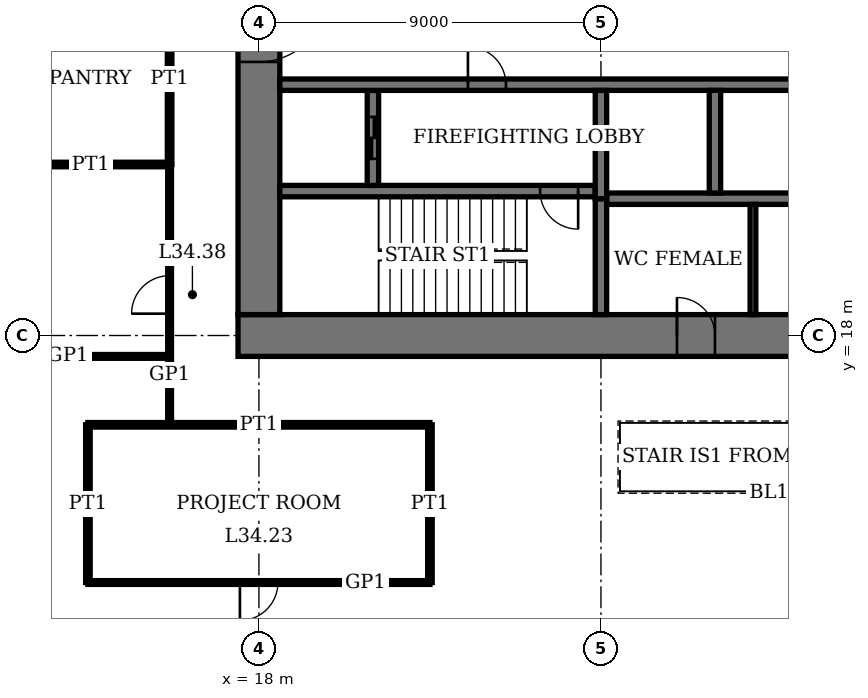
"""IFC4 building model, lengths in metres.
Left out: names, types, materials, properties, quantities, classifications, styles, units other than length and angle.
Written with IfcOpenShell. Run it as: python <this file> out.ifc"""

import sys

from ifc_helpers import new_model, si_unit, direction, frame, frame_2d, origin, place, context, subcontext, project, spatial, rectangle, extrude, element, fill, save


model = new_model("IFC4")
c1 = context("Model", 3, precision=1e-05, world=origin(), true_north=direction((0.0, 1.0)))
c2 = subcontext(c1, "Body", "Model", "MODEL_VIEW")
j1 = project(units=[si_unit("LENGTHUNIT", "METRE"), si_unit("PLANEANGLEUNIT", "RADIAN")], contexts=[c1])
p1 = place(None, origin())
s1 = spatial("IfcSite", under=j1, at=p1, CompositionType="ELEMENT")
p2 = place(p1, origin())
s2 = spatial("IfcBuilding", under=s1, at=p2, CompositionType="ELEMENT")
p3 = place(p2, frame((0.0, 0.0, 141.0)))
s3 = spatial("IfcBuildingStorey", under=s2, at=p3, CompositionType="ELEMENT", Elevation=141.0)
p4 = place(p3, frame((17.45, 18.0, 0.0), z_axis=(0.0, 0.0, 1.0), x_axis=(1.0, 0.0, 0.0)))
e1 = element("IfcWall", 1, at=p4, inside=s3, PredefinedType="SHEAR", context=c2, shape_type="SweptSolid", body=[
    extrude(rectangle(XDim=28.1, YDim=1.1, at=frame_2d((14.05, 0.0))), origin(), (0.0, 0.0, 1.0), 4.0),
])
p5 = place(p4, frame((11.55, 0.0, 0.0)))
e2 = element("IfcOpeningElement", 2, at=p5, cuts=e1, PredefinedType="OPENING", context=c2, shape_type="SweptSolid", body=[
    extrude(rectangle(XDim=1.0, YDim=2.4, at=frame_2d((0.5, 1.2))), frame((0.0, 0.56, 0.0), z_axis=(0.0, -1.0, 0.0), x_axis=(1.0, 0.0, 0.0)), (0.0, 0.0, 1.0), 1.12),
])
p6 = place(p4, frame((16.55, 0.0, 0.0)))
e3 = element("IfcOpeningElement", 3, at=p6, cuts=e1, PredefinedType="OPENING", context=c2, shape_type="SweptSolid", body=[
    extrude(rectangle(XDim=1.0, YDim=2.4, at=frame_2d((0.5, 1.2))), frame((0.0, 0.56, 0.0), z_axis=(0.0, -1.0, 0.0), x_axis=(1.0, 0.0, 0.0)), (0.0, 0.0, 1.0), 1.12),
])
p7 = place(p4, frame((20.0, 0.0, 0.0)))
e4 = element("IfcOpeningElement", 4, at=p7, cuts=e1, PredefinedType="OPENING", context=c2, shape_type="SweptSolid", body=[
    extrude(rectangle(XDim=1.1, YDim=2.4, at=frame_2d((0.55, 1.2))), frame((0.0, 0.56, 0.0), z_axis=(0.0, -1.0, 0.0), x_axis=(1.0, 0.0, 0.0)), (0.0, 0.0, 1.0), 1.12),
])
p8 = place(p4, frame((24.05, 0.0, 0.0)))
e5 = element("IfcOpeningElement", 5, at=p8, cuts=e1, PredefinedType="OPENING", context=c2, shape_type="SweptSolid", body=[
    extrude(rectangle(XDim=1.0, YDim=2.4, at=frame_2d((0.5, 1.2))), frame((0.0, 0.56, 0.0), z_axis=(0.0, -1.0, 0.0), x_axis=(1.0, 0.0, 0.0)), (0.0, 0.0, 1.0), 1.12),
])
p9 = place(p3, frame((18.0, 35.45, 0.0), z_axis=(0.0, 0.0, 1.0), x_axis=(0.0, -1.0, 0.0)))
e6 = element("IfcWall", 6, at=p9, inside=s3, PredefinedType="SHEAR", context=c2, shape_type="SweptSolid", body=[
    extrude(rectangle(XDim=16.9, YDim=1.1, at=frame_2d((8.45, 0.0))), origin(), (0.0, 0.0, 1.0), 4.0),
])
p10 = place(p9, frame((8.45, 0.0, 0.0)))
e7 = element("IfcOpeningElement", 7, at=p10, cuts=e6, PredefinedType="OPENING", context=c2, shape_type="SweptSolid", body=[
    extrude(rectangle(XDim=1.8, YDim=2.4, at=frame_2d((0.9, 1.2))), frame((0.0, 0.56, 0.0), z_axis=(0.0, -1.0, 0.0), x_axis=(1.0, 0.0, 0.0)), (0.0, 0.0, 1.0), 1.12),
])
p11 = place(p3, frame((18.55, 21.8, 0.0), z_axis=(0.0, 0.0, 1.0), x_axis=(1.0, 0.0, 0.0)))
e8 = element("IfcWall", 8, at=p11, inside=s3, PredefinedType="SHEAR", context=c2, shape_type="SweptSolid", body=[
    extrude(rectangle(XDim=8.3, YDim=0.3, at=frame_2d((4.15, 0.0))), origin(), (0.0, 0.0, 1.0), 4.0),
])
p12 = place(p11, frame((6.85, 0.0, 0.0)))
e9 = element("IfcOpeningElement", 9, at=p12, cuts=e8, PredefinedType="OPENING", context=c2, shape_type="SweptSolid", body=[
    extrude(rectangle(XDim=1.0, YDim=2.4, at=frame_2d((0.5, 1.2))), frame((0.0, 0.16, 0.0), z_axis=(0.0, -1.0, 0.0), x_axis=(1.0, 0.0, 0.0)), (0.0, 0.0, 1.0), 0.32),
])
p13 = place(p3, frame((27.0, 18.55, 0.0), z_axis=(0.0, 0.0, 1.0), x_axis=(0.0, 1.0, 0.0)))
e10 = element("IfcWall", 10, at=p13, inside=s3, PredefinedType="SHEAR", context=c2, shape_type="SweptSolid", body=[
    extrude(rectangle(XDim=3.05, YDim=0.3, at=frame_2d((1.525, 0.0))), origin(), (0.0, 0.0, 1.0), 4.0),
])
p14 = place(p3, frame((21.0, 21.95, 0.0), z_axis=(0.0, 0.0, 1.0), x_axis=(0.0, 1.0, 0.0)))
e11 = element("IfcWall", 11, at=p14, inside=s3, PredefinedType="SHEAR", context=c2, shape_type="SweptSolid", body=[
    extrude(rectangle(XDim=2.5, YDim=0.3, at=frame_2d((1.25, 0.0))), origin(), (0.0, 0.0, 1.0), 4.0),
])
p15 = place(p14, frame((0.7, 0.0, 0.0)))
e12 = element("IfcOpeningElement", 12, at=p15, cuts=e11, PredefinedType="OPENING", context=c2, shape_type="SweptSolid", body=[
    extrude(rectangle(XDim=1.1, YDim=2.4, at=frame_2d((0.55, 1.2))), frame((0.0, 0.16, 0.0), z_axis=(0.0, -1.0, 0.0), x_axis=(1.0, 0.0, 0.0)), (0.0, 0.0, 1.0), 0.32),
])
p16 = place(p3, frame((18.55, 24.6, 0.0), z_axis=(0.0, 0.0, 1.0), x_axis=(1.0, 0.0, 0.0)))
e13 = element("IfcWall", 13, at=p16, inside=s3, PredefinedType="SHEAR", context=c2, shape_type="SweptSolid", body=[
    extrude(rectangle(XDim=25.9, YDim=0.3, at=frame_2d((12.95, 0.0))), origin(), (0.0, 0.0, 1.0), 4.0),
])
p17 = place(p16, frame((4.95, 0.0, 0.0)))
e14 = element("IfcOpeningElement", 14, at=p17, cuts=e13, PredefinedType="OPENING", context=c2, shape_type="SweptSolid", body=[
    extrude(rectangle(XDim=1.0, YDim=2.4, at=frame_2d((0.5, 1.2))), frame((0.0, 0.16, 0.0), z_axis=(0.0, -1.0, 0.0), x_axis=(1.0, 0.0, 0.0)), (0.0, 0.0, 1.0), 0.32),
])
p18 = place(p16, frame((24.5, 0.0, 0.0)))
e15 = element("IfcOpeningElement", 15, at=p18, cuts=e13, PredefinedType="OPENING", context=c2, shape_type="SweptSolid", body=[
    extrude(rectangle(XDim=0.9, YDim=2.1, at=frame_2d((0.45, 1.05))), frame((0.0, 0.16, 0.0), z_axis=(0.0, -1.0, 0.0), x_axis=(1.0, 0.0, 0.0)), (0.0, 0.0, 1.0), 0.32),
])
p19 = place(p16, frame((21.3, 0.0, 0.0)))
e16 = element("IfcOpeningElement", 16, at=p19, cuts=e13, PredefinedType="OPENING", context=c2, shape_type="SweptSolid", body=[
    extrude(rectangle(XDim=1.3, YDim=2.4, at=frame_2d((0.65, 1.2))), frame((0.0, 0.16, 0.0), z_axis=(0.0, -1.0, 0.0), x_axis=(1.0, 0.0, 0.0)), (0.0, 0.0, 1.0), 0.32),
])
p20 = place(p3, frame((27.15, 21.6, 0.0), z_axis=(0.0, 0.0, 1.0), x_axis=(1.0, 0.0, 0.0)))
e17 = element("IfcWall", 17, at=p20, inside=s3, PredefinedType="SHEAR", context=c2, shape_type="SweptSolid", body=[
    extrude(rectangle(XDim=17.3, YDim=0.3, at=frame_2d((8.65, 0.0))), origin(), (0.0, 0.0, 1.0), 4.0),
])
p21 = place(p3, frame((30.0, 21.75, 0.0), z_axis=(0.0, 0.0, 1.0), x_axis=(0.0, 1.0, 0.0)))
e18 = element("IfcWall", 18, at=p21, inside=s3, PredefinedType="SHEAR", context=c2, shape_type="SweptSolid", body=[
    extrude(rectangle(XDim=2.7, YDim=0.3, at=frame_2d((1.35, 0.0))), origin(), (0.0, 0.0, 1.0), 4.0),
])
p22 = place(p3, frame((27.0, 21.6, 0.0), z_axis=(0.0, 0.0, 1.0), x_axis=(0.0, 1.0, 0.0)))
e19 = element("IfcWall", 19, at=p22, inside=s3, PredefinedType="SHEAR", context=c2, shape_type="SweptSolid", body=[
    extrude(rectangle(XDim=2.85, YDim=0.3, at=frame_2d((1.425, 0.0))), origin(), (0.0, 0.0, 1.0), 4.0),
])
p23 = place(p3, frame((13.5, 11.5, 0.0), z_axis=(0.0, 0.0, 1.0), x_axis=(1.0, 0.0, 0.0)))
e20 = element("IfcWall", 20, at=p23, inside=s3, PredefinedType="PARTITIONING", context=c2, shape_type="SweptSolid", body=[
    extrude(rectangle(XDim=9.0, YDim=0.1, at=frame_2d((4.5, 0.0))), origin(), (0.0, 0.0, 1.0), 3.75),
])
p24 = place(p23, frame((4.0, 0.0, 0.0)))
e21 = element("IfcOpeningElement", 21, at=p24, cuts=e20, PredefinedType="OPENING", context=c2, shape_type="SweptSolid", body=[
    extrude(rectangle(XDim=1.0, YDim=2.4, at=frame_2d((0.5, 1.2))), frame((0.0, 0.06, 0.0), z_axis=(0.0, -1.0, 0.0), x_axis=(1.0, 0.0, 0.0)), (0.0, 0.0, 1.0), 0.12),
])
p25 = place(p3, frame((13.5, 15.65, 0.0), z_axis=(0.0, 0.0, 1.0), x_axis=(1.0, 0.0, 0.0)))
e22 = element("IfcWall", 22, at=p25, inside=s3, PredefinedType="PARTITIONING", context=c2, shape_type="SweptSolid", body=[
    extrude(rectangle(XDim=9.0, YDim=0.12, at=frame_2d((4.5, 0.0))), origin(), (0.0, 0.0, 1.0), 3.75),
])
p26 = place(p3, frame((9.9, 17.45, 0.0), z_axis=(0.0, 0.0, 1.0), x_axis=(1.0, 0.0, 0.0)))
e23 = element("IfcWall", 23, at=p26, inside=s3, PredefinedType="PARTITIONING", context=c2, shape_type="SweptSolid", body=[
    extrude(rectangle(XDim=5.75, YDim=0.1, at=frame_2d((2.875, 0.0))), origin(), (0.0, 0.0, 1.0), 3.05),
])
p27 = place(p3, frame((11.5, 22.5, 0.0), z_axis=(0.0, 0.0, 1.0), x_axis=(1.0, 0.0, 0.0)))
e24 = element("IfcWall", 24, at=p27, inside=s3, PredefinedType="PARTITIONING", context=c2, shape_type="SweptSolid", body=[
    extrude(rectangle(XDim=4.15, YDim=0.12, at=frame_2d((2.075, 0.0))), origin(), (0.0, 0.0, 1.0), 3.1),
])
p28 = place(p3, frame((13.5, 11.5, 0.0), z_axis=(0.0, 0.0, 1.0), x_axis=(0.0, 1.0, 0.0)))
e25 = element("IfcWall", 25, at=p28, inside=s3, PredefinedType="PARTITIONING", context=c2, shape_type="SweptSolid", body=[
    extrude(rectangle(XDim=4.15, YDim=0.12, at=frame_2d((2.075, 0.0))), origin(), (0.0, 0.0, 1.0), 3.75),
])
p29 = place(p3, frame((15.65, 22.5, 0.0), z_axis=(0.0, 0.0, 1.0), x_axis=(0.0, 1.0, 0.0)))
e26 = element("IfcWall", 26, at=p29, inside=s3, PredefinedType="PARTITIONING", context=c2, shape_type="SweptSolid", body=[
    extrude(rectangle(XDim=4.5, YDim=0.12, at=frame_2d((2.25, 0.0))), origin(), (0.0, 0.0, 1.0), 3.75),
])
p30 = place(p3, frame((15.65, 15.65, 0.0), z_axis=(0.0, 0.0, 1.0), x_axis=(0.0, 1.0, 0.0)))
e27 = element("IfcWall", 27, at=p30, inside=s3, PredefinedType="PARTITIONING", context=c2, shape_type="SweptSolid", body=[
    extrude(rectangle(XDim=6.85, YDim=0.1, at=frame_2d((3.425, 0.0))), origin(), (0.0, 0.0, 1.0), 3.75),
])
p31 = place(p30, frame((2.925, 0.0, 0.0)))
e28 = element("IfcOpeningElement", 28, at=p31, cuts=e27, PredefinedType="OPENING", context=c2, shape_type="SweptSolid", body=[
    extrude(rectangle(XDim=1.0, YDim=2.4, at=frame_2d((0.5, 1.2))), frame((0.0, 0.06, 0.0), z_axis=(0.0, -1.0, 0.0), x_axis=(1.0, 0.0, 0.0)), (0.0, 0.0, 1.0), 0.12),
])
p32 = place(p3, frame((22.5, 11.5, 0.0), z_axis=(0.0, 0.0, 1.0), x_axis=(0.0, 1.0, 0.0)))
e29 = element("IfcWall", 29, at=p32, inside=s3, PredefinedType="PARTITIONING", context=c2, shape_type="SweptSolid", body=[
    extrude(rectangle(XDim=4.15, YDim=0.12, at=frame_2d((2.075, 0.0))), origin(), (0.0, 0.0, 1.0), 3.75),
])
p33 = place(p3, frame((31.0, 18.55, 0.0), z_axis=(0.0, 0.0, 1.0), x_axis=(0.0, 1.0, 0.0)))
e30 = element("IfcWall", 30, at=p33, inside=s3, PredefinedType="PARTITIONING", context=c2, shape_type="SweptSolid", body=[
    extrude(rectangle(XDim=2.9, YDim=0.15, at=frame_2d((1.45, 0.0))), origin(), (0.0, 0.0, 1.0), 3.75),
])
p34 = place(p10, origin())
e31 = element("IfcDoor", 31, at=p34, inside=s3, OperationType="DOUBLE_DOOR_DOUBLE_SWING", PredefinedType="DOOR", context=c2, shape_type="SweptSolid", body=[
    extrude(rectangle(XDim=1.8, YDim=2.4, at=frame_2d((0.9, 1.2))), frame((0.0, 0.03, 0.0), z_axis=(0.0, -1.0, 0.0), x_axis=(1.0, 0.0, 0.0)), (0.0, 0.0, 1.0), 0.06),
    extrude(rectangle(XDim=0.04, YDim=2.4, at=frame_2d((0.02, 1.2))), frame((0.0, 0.55, 0.0), z_axis=(0.0, -1.0, 0.0), x_axis=(1.0, 0.0, 0.0)), (0.0, 0.0, 1.0), 1.1),
    extrude(rectangle(XDim=0.04, YDim=2.4, at=frame_2d((1.78, 1.2))), frame((0.0, 0.55, 0.0), z_axis=(0.0, -1.0, 0.0), x_axis=(1.0, 0.0, 0.0)), (0.0, 0.0, 1.0), 1.1),
    extrude(rectangle(XDim=1.8, YDim=0.04, at=frame_2d((0.9, 2.38))), frame((0.0, 0.55, 0.0), z_axis=(0.0, -1.0, 0.0), x_axis=(1.0, 0.0, 0.0)), (0.0, 0.0, 1.0), 1.1),
])
fill(e7, e31)
p35 = place(p5, origin())
e32 = element("IfcDoor", 32, at=p35, inside=s3, OperationType="SINGLE_SWING_RIGHT", PredefinedType="DOOR", context=c2, shape_type="SweptSolid", body=[
    extrude(rectangle(XDim=1.0, YDim=2.4, at=frame_2d((0.5, 1.2))), frame((0.0, 0.025, 0.0), z_axis=(0.0, -1.0, 0.0), x_axis=(1.0, 0.0, 0.0)), (0.0, 0.0, 1.0), 0.05),
    extrude(rectangle(XDim=0.04, YDim=2.4, at=frame_2d((0.02, 1.2))), frame((0.0, 0.4, 0.0), z_axis=(0.0, -1.0, 0.0), x_axis=(1.0, 0.0, 0.0)), (0.0, 0.0, 1.0), 0.8),
    extrude(rectangle(XDim=0.04, YDim=2.4, at=frame_2d((0.98, 1.2))), frame((0.0, 0.4, 0.0), z_axis=(0.0, -1.0, 0.0), x_axis=(1.0, 0.0, 0.0)), (0.0, 0.0, 1.0), 0.8),
    extrude(rectangle(XDim=1.0, YDim=0.04, at=frame_2d((0.5, 2.38))), frame((0.0, 0.4, 0.0), z_axis=(0.0, -1.0, 0.0), x_axis=(1.0, 0.0, 0.0)), (0.0, 0.0, 1.0), 0.8),
])
fill(e2, e32)
p36 = place(p12, origin())
e33 = element("IfcDoor", 33, at=p36, inside=s3, OperationType="SINGLE_SWING_RIGHT", PredefinedType="DOOR", context=c2, shape_type="SweptSolid", body=[
    extrude(rectangle(XDim=1.0, YDim=2.4, at=frame_2d((0.5, 1.2))), frame((0.0, 0.03, 0.0), z_axis=(0.0, -1.0, 0.0), x_axis=(1.0, 0.0, 0.0)), (0.0, 0.0, 1.0), 0.06),
])
fill(e9, e33)
p37 = place(p17, origin())
e34 = element("IfcDoor", 34, at=p37, inside=s3, OperationType="SINGLE_SWING_RIGHT", PredefinedType="DOOR", context=c2, shape_type="SweptSolid", body=[
    extrude(rectangle(XDim=1.0, YDim=2.4, at=frame_2d((0.5, 1.2))), frame((0.0, 0.03, 0.0), z_axis=(0.0, -1.0, 0.0), x_axis=(1.0, 0.0, 0.0)), (0.0, 0.0, 1.0), 0.06),
])
fill(e14, e34)
p38 = place(p24, origin())
e35 = element("IfcDoor", 35, at=p38, inside=s3, OperationType="SINGLE_SWING_LEFT", PredefinedType="DOOR", context=c2, shape_type="SweptSolid", body=[
    extrude(rectangle(XDim=1.0, YDim=2.4, at=frame_2d((0.5, 1.2))), frame((0.0, 0.02, 0.0), z_axis=(0.0, -1.0, 0.0), x_axis=(1.0, 0.0, 0.0)), (0.0, 0.0, 1.0), 0.04),
])
fill(e21, e35)
p39 = place(p31, origin())
e36 = element("IfcDoor", 36, at=p39, inside=s3, OperationType="SINGLE_SWING_RIGHT", PredefinedType="DOOR", context=c2, shape_type="SweptSolid", body=[
    extrude(rectangle(XDim=1.0, YDim=2.4, at=frame_2d((0.5, 1.2))), frame((0.0, 0.02, 0.0), z_axis=(0.0, -1.0, 0.0), x_axis=(1.0, 0.0, 0.0)), (0.0, 0.0, 1.0), 0.04),
])
fill(e28, e36)
p40 = place(p15, origin())
e37 = element("IfcDoor", 37, at=p40, inside=s3, OperationType="DOUBLE_DOOR_SLIDING", PredefinedType="DOOR", context=c2, shape_type="SweptSolid", body=[
    extrude(rectangle(XDim=1.1, YDim=2.4, at=frame_2d((0.55, 1.2))), frame((0.0, 0.03, 0.0), z_axis=(0.0, -1.0, 0.0), x_axis=(1.0, 0.0, 0.0)), (0.0, 0.0, 1.0), 0.06),
])
fill(e12, e37)
save(model, sys.argv[1])
